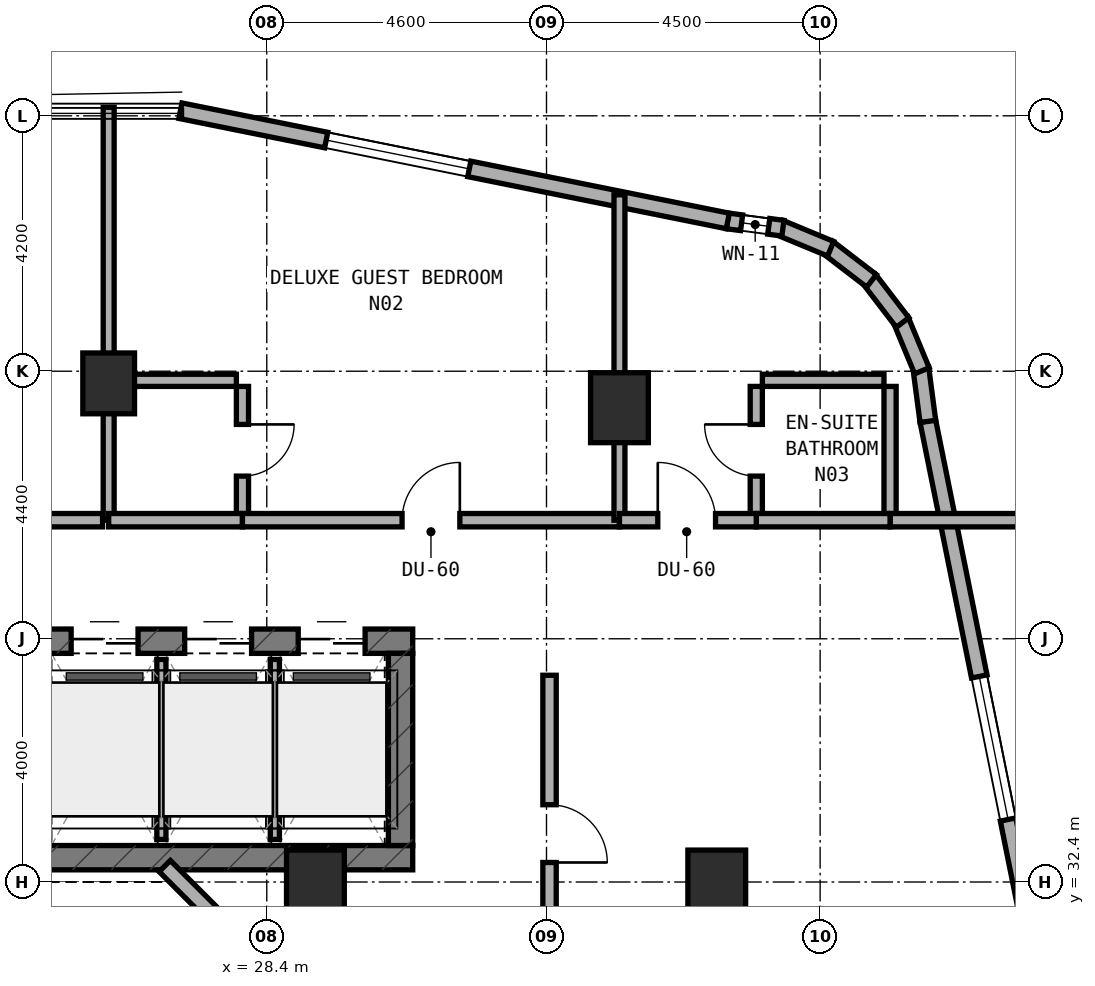
"""IFC4 building model, lengths in metres.
Left out: names, types, materials, properties, quantities, classifications, styles, units other than length and angle.
Written with IfcOpenShell. Run it as: python <this file> out.ifc"""

import sys

from ifc_helpers import new_model, si_unit, direction, frame, frame_2d, origin, origin_2d, place, context, subcontext, project, spatial, rectangle, extrude, element, fill, save


model = new_model("IFC4")
c1 = context("Model", 3, precision=1e-05, world=origin(), true_north=direction((0.0, 1.0)))
c2 = subcontext(c1, "Body", "Model", "MODEL_VIEW")
j1 = project(units=[si_unit("LENGTHUNIT", "METRE"), si_unit("PLANEANGLEUNIT", "RADIAN")], contexts=[c1])
p1 = place(None, origin())
s1 = spatial("IfcSite", under=j1, at=p1, CompositionType="ELEMENT")
p2 = place(p1, origin())
s2 = spatial("IfcBuilding", under=s1, at=p2, CompositionType="ELEMENT")
p3 = place(p2, frame((0.0, 0.0, 98.5)))
s3 = spatial("IfcBuildingStorey", under=s2, at=p3, CompositionType="ELEMENT", Elevation=98.5)
p4 = place(p3, frame((6.4, 32.8, 0.0), z_axis=(0.0, 0.0, 1.0), x_axis=(1.0, 0.0, 0.0)))
e1 = element("IfcWall", 1, at=p4, inside=s3, PredefinedType="SHEAR", context=c2, shape_type="SweptSolid", body=[
    extrude(rectangle(XDim=24.4, YDim=0.4, at=frame_2d((12.2, 0.0))), origin(), (0.0, 0.0, 1.0), 3.5),
])
p5 = place(p4, frame((6.05, 0.0, 0.0)))
e2 = element("IfcOpeningElement", 2, at=p5, cuts=e1, PredefinedType="OPENING", context=c2, shape_type="SweptSolid", body=[
    extrude(rectangle(XDim=1.1, YDim=2.15, at=frame_2d((0.55, 1.075))), frame((0.0, 0.21, 0.0), z_axis=(0.0, -1.0, 0.0), x_axis=(1.0, 0.0, 0.0)), (0.0, 0.0, 1.0), 0.42),
])
p6 = place(p3, frame((6.4, 36.36, 0.0), z_axis=(0.0, 0.0, 1.0), x_axis=(1.0, 0.0, 0.0)))
e3 = element("IfcWall", 3, at=p6, inside=s3, PredefinedType="SHEAR", context=c2, shape_type="SweptSolid", body=[
    extrude(rectangle(XDim=24.4, YDim=0.4, at=frame_2d((12.2, 0.0))), origin(), (0.0, 0.0, 1.0), 3.5),
])
p7 = place(p6, frame((9.15, 0.0, 0.0)))
e4 = element("IfcOpeningElement", 4, at=p7, cuts=e3, PredefinedType="OPENING", context=c2, shape_type="SweptSolid", body=[
    extrude(rectangle(XDim=1.2, YDim=2.15, at=frame_2d((0.6, 1.075))), frame((0.0, 0.21, 0.0), z_axis=(0.0, -1.0, 0.0), x_axis=(1.0, 0.0, 0.0)), (0.0, 0.0, 1.0), 0.42),
])
p8 = place(p6, frame((16.94, 0.0, 0.0)))
e5 = element("IfcOpeningElement", 5, at=p8, cuts=e3, PredefinedType="OPENING", context=c2, shape_type="SweptSolid", body=[
    extrude(rectangle(XDim=0.85, YDim=2.1, at=frame_2d((0.425, 1.05))), frame((0.0, 0.21, 0.0), z_axis=(0.0, -1.0, 0.0), x_axis=(1.0, 0.0, 0.0)), (0.0, 0.0, 1.0), 0.42),
])
p9 = place(p6, frame((18.783, 0.0, 0.0)))
e6 = element("IfcOpeningElement", 6, at=p9, cuts=e3, PredefinedType="OPENING", context=c2, shape_type="SweptSolid", body=[
    extrude(rectangle(XDim=1.1, YDim=2.15, at=frame_2d((0.55, 1.075))), frame((0.0, 0.21, 0.0), z_axis=(0.0, -1.0, 0.0), x_axis=(1.0, 0.0, 0.0)), (0.0, 0.0, 1.0), 0.42),
])
p10 = place(p6, frame((20.65, 0.0, 0.0)))
e7 = element("IfcOpeningElement", 7, at=p10, cuts=e3, PredefinedType="OPENING", context=c2, shape_type="SweptSolid", body=[
    extrude(rectangle(XDim=1.1, YDim=2.15, at=frame_2d((0.55, 1.075))), frame((0.0, 0.21, 0.0), z_axis=(0.0, -1.0, 0.0), x_axis=(1.0, 0.0, 0.0)), (0.0, 0.0, 1.0), 0.42),
])
p11 = place(p6, frame((22.517, 0.0, 0.0)))
e8 = element("IfcOpeningElement", 8, at=p11, cuts=e3, PredefinedType="OPENING", context=c2, shape_type="SweptSolid", body=[
    extrude(rectangle(XDim=1.1, YDim=2.15, at=frame_2d((0.55, 1.075))), frame((0.0, 0.21, 0.0), z_axis=(0.0, -1.0, 0.0), x_axis=(1.0, 0.0, 0.0)), (0.0, 0.0, 1.0), 0.42),
])
p12 = place(p3, frame((30.6, 33.0, 0.0), z_axis=(0.0, 0.0, 1.0), x_axis=(0.0, 1.0, 0.0)))
e9 = element("IfcWall", 9, at=p12, inside=s3, PredefinedType="SHEAR", context=c2, shape_type="SweptSolid", body=[
    extrude(rectangle(XDim=3.16, YDim=0.4, at=frame_2d((1.58, 0.0))), origin(), (0.0, 0.0, 1.0), 3.5),
])
p13 = place(p3, frame((25.8, 40.6, 0.0), z_axis=(0.0, 0.0, 1.0), x_axis=(1.0, 0.0, 0.0)))
e10 = element("IfcColumn", 10, at=p13, inside=s3, PredefinedType="COLUMN", context=c2, shape_type="SweptSolid", body=[
    extrude(rectangle(XDim=0.85, YDim=1.0, at=origin_2d()), origin(), (0.0, 0.0, 1.0), 3.5),
])
for number, where, z_axis, x_axis in (
    (11, (34.2, 40.2, 0.0), (0.0, 0.0, 1.0), (1.0, 0.0, 0.0)),
    (12, (35.8, 32.35, 0.0), (0.0, 0.0, 1.0), (1.0, 0.0, 0.0)),
    (13, (29.2, 32.35, 0.0), (0.0, 0.0, 1.0), (1.0, 0.0, 0.0)),
):
    element("IfcColumn", number, at=place(p3, frame(where, z_axis=z_axis, x_axis=x_axis)), inside=s3, PredefinedType="COLUMN", context=c2, shape_type="SweptSolid", body=[
        extrude(rectangle(XDim=0.95, YDim=1.15, at=origin_2d()), origin(), (0.0, 0.0, 1.0), 3.5),
    ])
p14 = place(p3, frame((41.084, 30.98, 0.0), z_axis=(0.0, 0.0, 1.0), x_axis=(-0.197435082048, 0.980315963543, 0.0)))
e14 = element("IfcWall", 14, at=p14, inside=s3, PredefinedType="STANDARD", context=c2, shape_type="SweptSolid", body=[
    extrude(rectangle(XDim=9.183, YDim=0.26, at=frame_2d((4.591, 0.0))), origin(), (0.0, 0.0, 1.0), 3.22),
])
p15 = place(p14, frame((2.497, 0.0, 0.8)))
e15 = element("IfcOpeningElement", 15, at=p15, cuts=e14, PredefinedType="OPENING", context=c2, shape_type="SweptSolid", body=[
    extrude(rectangle(XDim=2.4, YDim=1.6, at=frame_2d((1.2, 0.8))), frame((0.0, 0.14, 0.0), z_axis=(0.0, -1.0, 0.0), x_axis=(1.0, 0.0, 0.0)), (0.0, 0.0, 1.0), 0.28),
])
p16 = place(p3, frame((39.272, 39.975, 0.0), z_axis=(0.0, 0.0, 1.0), x_axis=(-0.130953706898, 0.991388484223, 0.0)))
e16 = element("IfcWall", 16, at=p16, inside=s3, PredefinedType="STANDARD", context=c2, shape_type="SweptSolid", body=[
    extrude(rectangle(XDim=0.885, YDim=0.26, at=frame_2d((0.443, 0.0))), origin(), (0.0, 0.0, 1.0), 3.22),
])
p17 = place(p3, frame((39.174, 40.807, 0.0), z_axis=(0.0, 0.0, 1.0), x_axis=(-0.383290660547, 0.923627776508, 0.0)))
e17 = element("IfcWall", 17, at=p17, inside=s3, PredefinedType="STANDARD", context=c2, shape_type="SweptSolid", body=[
    extrude(rectangle(XDim=0.903, YDim=0.26, at=frame_2d((0.452, 0.0))), origin(), (0.0, 0.0, 1.0), 3.22),
])
p18 = place(p3, frame((38.856, 41.601, 0.0), z_axis=(0.0, 0.0, 1.0), x_axis=(-0.608624690463, 0.793458244748, 0.0)))
e18 = element("IfcWall", 18, at=p18, inside=s3, PredefinedType="STANDARD", context=c2, shape_type="SweptSolid", body=[
    extrude(rectangle(XDim=0.902, YDim=0.26, at=frame_2d((0.451, 0.0))), origin(), (0.0, 0.0, 1.0), 3.22),
])
p19 = place(p3, frame((38.345, 42.286, 0.0), z_axis=(0.0, 0.0, 1.0), x_axis=(-0.793558456666, 0.608494022858, 0.0)))
e19 = element("IfcWall", 19, at=p19, inside=s3, PredefinedType="STANDARD", context=c2, shape_type="SweptSolid", body=[
    extrude(rectangle(XDim=0.902, YDim=0.26, at=frame_2d((0.451, 0.0))), origin(), (0.0, 0.0, 1.0), 3.22),
])
p20 = place(p3, frame((37.673, 42.814, 0.0), z_axis=(0.0, 0.0, 1.0), x_axis=(-0.923683767999, 0.383155708213, 0.0)))
e20 = element("IfcWall", 20, at=p20, inside=s3, PredefinedType="STANDARD", context=c2, shape_type="SweptSolid", body=[
    extrude(rectangle(XDim=0.903, YDim=0.26, at=frame_2d((0.451, 0.0))), origin(), (0.0, 0.0, 1.0), 3.22),
])
p21 = place(p3, frame((36.888, 43.152, 0.0), z_axis=(0.0, 0.0, 1.0), x_axis=(-0.991487658083, 0.130200706103, 0.0)))
e21 = element("IfcWall", 21, at=p21, inside=s3, PredefinedType="STANDARD", context=c2, shape_type="SweptSolid", body=[
    extrude(rectangle(XDim=0.921, YDim=0.26, at=frame_2d((0.46, 0.0))), origin(), (0.0, 0.0, 1.0), 3.22),
])
p22 = place(p21, frame((0.235, 0.0, 0.85)))
e22 = element("IfcOpeningElement", 22, at=p22, cuts=e21, PredefinedType="OPENING", context=c2, shape_type="SweptSolid", body=[
    extrude(rectangle(XDim=0.45, YDim=1.5, at=frame_2d((0.225, 0.75))), frame((0.0, 0.14, 0.0), z_axis=(0.0, -1.0, 0.0), x_axis=(1.0, 0.0, 0.0)), (0.0, 0.0, 1.0), 0.28),
])
p23 = place(p3, frame((35.982, 43.271, 0.0), z_axis=(0.0, 0.0, 1.0), x_axis=(-0.980315963543, 0.197435082048, 0.0)))
e23 = element("IfcWall", 23, at=p23, inside=s3, PredefinedType="STANDARD", context=c2, shape_type="SweptSolid", body=[
    extrude(rectangle(XDim=9.183, YDim=0.26, at=frame_2d((4.591, 0.0))), origin(), (0.0, 0.0, 1.0), 3.22),
])
p24 = place(p23, frame((4.337, 0.0, 0.8)))
e24 = element("IfcOpeningElement", 24, at=p24, cuts=e23, PredefinedType="OPENING", context=c2, shape_type="SweptSolid", body=[
    extrude(rectangle(XDim=2.4, YDim=1.6, at=frame_2d((1.2, 0.8))), frame((0.0, 0.14, 0.0), z_axis=(0.0, -1.0, 0.0), x_axis=(1.0, 0.0, 0.0)), (0.0, 0.0, 1.0), 0.28),
])
p25 = place(p3, frame((28.556, 30.828, 0.0), z_axis=(0.0, 0.0, 1.0), x_axis=(-0.707059717605, 0.707153841636, 0.0)))
e25 = element("IfcWall", 25, at=p25, inside=s3, PredefinedType="STANDARD", context=c2, shape_type="SweptSolid", body=[
    extrude(rectangle(XDim=2.594, YDim=0.26, at=frame_2d((1.297, 0.0))), origin(), (0.0, 0.0, 1.0), 3.22),
])
p26 = place(p3, frame((26.667, 33.1, 0.0), z_axis=(0.0, 0.0, 1.0), x_axis=(0.0, 1.0, 0.0)))
e26 = element("IfcWall", 26, at=p26, inside=s3, PredefinedType="PARTITIONING", context=c2, shape_type="SweptSolid", body=[
    extrude(rectangle(XDim=2.96, YDim=0.15, at=frame_2d((1.48, 0.0))), origin(), (0.0, 0.0, 1.0), 3.22),
])
p27 = place(p3, frame((28.533, 33.1, 0.0), z_axis=(0.0, 0.0, 1.0), x_axis=(0.0, 1.0, 0.0)))
e27 = element("IfcWall", 27, at=p27, inside=s3, PredefinedType="PARTITIONING", context=c2, shape_type="SweptSolid", body=[
    extrude(rectangle(XDim=2.96, YDim=0.15, at=frame_2d((1.48, 0.0))), origin(), (0.0, 0.0, 1.0), 2.595),
])
p28 = place(p3, frame((16.3, 38.35, 0.0), z_axis=(0.0, 0.0, 1.0), x_axis=(1.0, 0.0, 0.0)))
e28 = element("IfcWall", 28, at=p28, inside=s3, PredefinedType="SOLIDWALL", context=c2, shape_type="SweptSolid", body=[
    extrude(rectangle(XDim=9.4, YDim=0.22, at=frame_2d((4.7, 0.0))), origin(), (0.0, 0.0, 1.0), 3.22),
])
p29 = place(p28, frame((3.793, 0.0, 0.0)))
e29 = element("IfcOpeningElement", 29, at=p29, cuts=e28, PredefinedType="OPENING", context=c2, shape_type="SweptSolid", body=[
    extrude(rectangle(XDim=0.95, YDim=2.1, at=frame_2d((0.475, 1.05))), frame((0.0, 0.12, 0.0), z_axis=(0.0, -1.0, 0.0), x_axis=(1.0, 0.0, 0.0)), (0.0, 0.0, 1.0), 0.24),
])
p30 = place(p3, frame((25.8, 38.35, 0.0), z_axis=(0.0, 0.0, 1.0), x_axis=(0.0, 1.0, 0.0)))
e30 = element("IfcWall", 30, at=p30, inside=s3, PredefinedType="SOLIDWALL", context=c2, shape_type="SweptSolid", body=[
    extrude(rectangle(XDim=6.79, YDim=0.18, at=frame_2d((3.395, 0.0))), origin(), (0.0, 0.0, 1.0), 2.595),
])
p31 = place(p3, frame((28.0, 38.45, 0.0), z_axis=(0.0, 0.0, 1.0), x_axis=(0.0, 1.0, 0.0)))
e31 = element("IfcWall", 31, at=p31, inside=s3, PredefinedType="PLUMBINGWALL", context=c2, shape_type="SweptSolid", body=[
    extrude(rectangle(XDim=2.1, YDim=0.2, at=frame_2d((1.05, 0.0))), origin(), (0.0, 0.0, 1.0), 2.835),
])
p32 = place(p31, frame((0.625, 0.0, 0.0)))
e32 = element("IfcOpeningElement", 32, at=p32, cuts=e31, PredefinedType="OPENING", context=c2, shape_type="SweptSolid", body=[
    extrude(rectangle(XDim=0.85, YDim=2.1, at=frame_2d((0.425, 1.05))), frame((0.0, 0.11, 0.0), z_axis=(0.0, -1.0, 0.0), x_axis=(1.0, 0.0, 0.0)), (0.0, 0.0, 1.0), 0.22),
])
p33 = place(p3, frame((25.9, 40.65, 0.0), z_axis=(0.0, 0.0, 1.0), x_axis=(1.0, 0.0, 0.0)))
e33 = element("IfcWall", 33, at=p33, inside=s3, PredefinedType="PLUMBINGWALL", context=c2, shape_type="SweptSolid", body=[
    extrude(rectangle(XDim=2.0, YDim=0.2, at=frame_2d((1.0, 0.0))), origin(), (0.0, 0.0, 1.0), 2.835),
])
p34 = place(p3, frame((25.8, 38.35, 0.0), z_axis=(0.0, 0.0, 1.0), x_axis=(1.0, 0.0, 0.0)))
e34 = element("IfcWall", 34, at=p34, inside=s3, PredefinedType="SOLIDWALL", context=c2, shape_type="SweptSolid", body=[
    extrude(rectangle(XDim=2.2, YDim=0.22, at=frame_2d((1.1, 0.0))), origin(), (0.0, 0.0, 1.0), 2.595),
])
p35 = place(p3, frame((28.0, 38.35, 0.0), z_axis=(0.0, 0.0, 1.0), x_axis=(1.0, 0.0, 0.0)))
e35 = element("IfcWall", 35, at=p35, inside=s3, PredefinedType="SOLIDWALL", context=c2, shape_type="SweptSolid", body=[
    extrude(rectangle(XDim=6.2, YDim=0.22, at=frame_2d((3.1, 0.0))), origin(), (0.0, 0.0, 1.0), 2.595),
])
p36 = place(p35, frame((2.625, 0.0, 0.0)))
e36 = element("IfcOpeningElement", 36, at=p36, cuts=e35, PredefinedType="OPENING", context=c2, shape_type="SweptSolid", body=[
    extrude(rectangle(XDim=0.95, YDim=2.1, at=frame_2d((0.475, 1.05))), frame((0.0, 0.12, 0.0), z_axis=(0.0, -1.0, 0.0), x_axis=(1.0, 0.0, 0.0)), (0.0, 0.0, 1.0), 0.24),
])
p37 = place(p3, frame((34.2, 38.35, 0.0), z_axis=(0.0, 0.0, 1.0), x_axis=(0.0, 1.0, 0.0)))
e37 = element("IfcWall", 37, at=p37, inside=s3, PredefinedType="SOLIDWALL", context=c2, shape_type="SweptSolid", body=[
    extrude(rectangle(XDim=5.351, YDim=0.18, at=frame_2d((2.675, 0.0))), origin(), (0.0, 0.0, 1.0), 2.595),
])
p38 = place(p3, frame((36.45, 38.45, 0.0), z_axis=(0.0, 0.0, 1.0), x_axis=(0.0, 1.0, 0.0)))
e38 = element("IfcWall", 38, at=p38, inside=s3, PredefinedType="PLUMBINGWALL", context=c2, shape_type="SweptSolid", body=[
    extrude(rectangle(XDim=2.1, YDim=0.2, at=frame_2d((1.05, 0.0))), origin(), (0.0, 0.0, 1.0), 3.22),
])
p39 = place(p38, frame((0.625, 0.0, 0.0)))
e39 = element("IfcOpeningElement", 39, at=p39, cuts=e38, PredefinedType="OPENING", context=c2, shape_type="SweptSolid", body=[
    extrude(rectangle(XDim=0.85, YDim=2.1, at=frame_2d((0.425, 1.05))), frame((0.0, 0.11, 0.0), z_axis=(0.0, -1.0, 0.0), x_axis=(1.0, 0.0, 0.0)), (0.0, 0.0, 1.0), 0.22),
])
p40 = place(p3, frame((36.55, 40.65, 0.0), z_axis=(0.0, 0.0, 1.0), x_axis=(1.0, 0.0, 0.0)))
e40 = element("IfcWall", 40, at=p40, inside=s3, PredefinedType="PLUMBINGWALL", context=c2, shape_type="SweptSolid", body=[
    extrude(rectangle(XDim=2.0, YDim=0.2, at=frame_2d((1.0, 0.0))), origin(), (0.0, 0.0, 1.0), 3.22),
])
p41 = place(p3, frame((38.65, 38.45, 0.0), z_axis=(0.0, 0.0, 1.0), x_axis=(0.0, 1.0, 0.0)))
e41 = element("IfcWall", 41, at=p41, inside=s3, PredefinedType="PLUMBINGWALL", context=c2, shape_type="SweptSolid", body=[
    extrude(rectangle(XDim=2.1, YDim=0.2, at=frame_2d((1.05, 0.0))), origin(), (0.0, 0.0, 1.0), 3.22),
])
p42 = place(p3, frame((38.65, 38.35, 0.0), z_axis=(0.0, 0.0, 1.0), x_axis=(1.0, 0.0, 0.0)))
e42 = element("IfcWall", 42, at=p42, inside=s3, PredefinedType="SOLIDWALL", context=c2, shape_type="SweptSolid", body=[
    extrude(rectangle(XDim=2.39, YDim=0.22, at=frame_2d((1.195, 0.0))), origin(), (0.0, 0.0, 1.0), 3.22),
])
p43 = place(p3, frame((36.45, 38.35, 0.0), z_axis=(0.0, 0.0, 1.0), x_axis=(1.0, 0.0, 0.0)))
e43 = element("IfcWall", 43, at=p43, inside=s3, PredefinedType="SOLIDWALL", context=c2, shape_type="SweptSolid", body=[
    extrude(rectangle(XDim=2.2, YDim=0.22, at=frame_2d((1.1, 0.0))), origin(), (0.0, 0.0, 1.0), 3.22),
])
p44 = place(p3, frame((34.2, 38.35, 0.0), z_axis=(0.0, 0.0, 1.0), x_axis=(1.0, 0.0, 0.0)))
e44 = element("IfcWall", 44, at=p44, inside=s3, PredefinedType="SOLIDWALL", context=c2, shape_type="SweptSolid", body=[
    extrude(rectangle(XDim=2.25, YDim=0.22, at=frame_2d((1.125, 0.0))), origin(), (0.0, 0.0, 1.0), 2.595),
])
p45 = place(p44, frame((0.63, 0.0, 0.0)))
e45 = element("IfcOpeningElement", 45, at=p45, cuts=e44, PredefinedType="OPENING", context=c2, shape_type="SweptSolid", body=[
    extrude(rectangle(XDim=0.95, YDim=2.1, at=frame_2d((0.475, 1.05))), frame((0.0, 0.12, 0.0), z_axis=(0.0, -1.0, 0.0), x_axis=(1.0, 0.0, 0.0)), (0.0, 0.0, 1.0), 0.24),
])
p46 = place(p3, frame((33.05, 30.593, 0.0), z_axis=(0.0, 0.0, 1.0), x_axis=(0.0, 1.0, 0.0)))
e46 = element("IfcWall", 46, at=p46, inside=s3, PredefinedType="SOLIDWALL", context=c2, shape_type="SweptSolid", body=[
    extrude(rectangle(XDim=5.207, YDim=0.22, at=frame_2d((2.604, 0.0))), origin(), (0.0, 0.0, 1.0), 2.595),
])
p47 = place(p46, frame((2.128, 0.0, 0.0)))
e47 = element("IfcOpeningElement", 47, at=p47, cuts=e46, PredefinedType="OPENING", context=c2, shape_type="SweptSolid", body=[
    extrude(rectangle(XDim=0.95, YDim=2.1, at=frame_2d((0.475, 1.05))), frame((0.0, 0.12, 0.0), z_axis=(0.0, -1.0, 0.0), x_axis=(1.0, 0.0, 0.0)), (0.0, 0.0, 1.0), 0.24),
])
p48 = place(p15, origin())
e48 = element("IfcWindow", 48, at=p48, inside=s3, PartitioningType="SINGLE_PANEL", PredefinedType="WINDOW", context=c2, shape_type="SweptSolid", body=[
    extrude(rectangle(XDim=2.4, YDim=1.6, at=frame_2d((1.2, 0.8))), frame((0.0, 0.03, 0.0), z_axis=(0.0, -1.0, 0.0), x_axis=(1.0, 0.0, 0.0)), (0.0, 0.0, 1.0), 0.06),
])
fill(e15, e48)
p49 = place(p24, origin())
e49 = element("IfcWindow", 49, at=p49, inside=s3, PartitioningType="SINGLE_PANEL", PredefinedType="WINDOW", context=c2, shape_type="SweptSolid", body=[
    extrude(rectangle(XDim=2.4, YDim=1.6, at=frame_2d((1.2, 0.8))), frame((0.0, 0.03, 0.0), z_axis=(0.0, -1.0, 0.0), x_axis=(1.0, 0.0, 0.0)), (0.0, 0.0, 1.0), 0.06),
])
fill(e24, e49)
p50 = place(p22, origin())
e50 = element("IfcWindow", 50, at=p50, inside=s3, PartitioningType="SINGLE_PANEL", PredefinedType="WINDOW", context=c2, shape_type="SweptSolid", body=[
    extrude(rectangle(XDim=0.45, YDim=1.5, at=frame_2d((0.225, 0.75))), frame((0.0, 0.03, 0.0), z_axis=(0.0, -1.0, 0.0), x_axis=(1.0, 0.0, 0.0)), (0.0, 0.0, 1.0), 0.06),
])
fill(e22, e50)
p51 = place(p9, origin())
e51 = element("IfcDoor", 51, at=p51, inside=s3, OperationType="DOUBLE_DOOR_SLIDING", PredefinedType="DOOR", context=c2, shape_type="SweptSolid", body=[
    extrude(rectangle(XDim=1.1, YDim=2.15, at=frame_2d((0.55, 1.075))), frame((0.0, 0.025, 0.0), z_axis=(0.0, -1.0, 0.0), x_axis=(1.0, 0.0, 0.0)), (0.0, 0.0, 1.0), 0.05),
])
fill(e6, e51)
p52 = place(p10, origin())
e52 = element("IfcDoor", 52, at=p52, inside=s3, OperationType="DOUBLE_DOOR_SLIDING", PredefinedType="DOOR", context=c2, shape_type="SweptSolid", body=[
    extrude(rectangle(XDim=1.1, YDim=2.15, at=frame_2d((0.55, 1.075))), frame((0.0, 0.025, 0.0), z_axis=(0.0, -1.0, 0.0), x_axis=(1.0, 0.0, 0.0)), (0.0, 0.0, 1.0), 0.05),
])
fill(e7, e52)
p53 = place(p11, origin())
e53 = element("IfcDoor", 53, at=p53, inside=s3, OperationType="DOUBLE_DOOR_SLIDING", PredefinedType="DOOR", context=c2, shape_type="SweptSolid", body=[
    extrude(rectangle(XDim=1.1, YDim=2.15, at=frame_2d((0.55, 1.075))), frame((0.0, 0.025, 0.0), z_axis=(0.0, -1.0, 0.0), x_axis=(1.0, 0.0, 0.0)), (0.0, 0.0, 1.0), 0.05),
])
fill(e8, e53)
p54 = place(p32, frame((0.85, 0.0, 0.0), z_axis=(0.0, 0.0, 1.0), x_axis=(-1.0, 0.0, 0.0)))
e54 = element("IfcDoor", 54, at=p54, inside=s3, OperationType="SINGLE_SWING_LEFT", PredefinedType="DOOR", context=c2, shape_type="SweptSolid", body=[
    extrude(rectangle(XDim=0.85, YDim=2.1, at=frame_2d((0.425, 1.05))), frame((0.0, 0.025, 0.0), z_axis=(0.0, -1.0, 0.0), x_axis=(1.0, 0.0, 0.0)), (0.0, 0.0, 1.0), 0.05),
])
fill(e32, e54)
p55 = place(p36, origin())
e55 = element("IfcDoor", 55, at=p55, inside=s3, OperationType="SINGLE_SWING_RIGHT", PredefinedType="DOOR", context=c2, shape_type="SweptSolid", body=[
    extrude(rectangle(XDim=0.95, YDim=2.1, at=frame_2d((0.475, 1.05))), frame((0.0, 0.025, 0.0), z_axis=(0.0, -1.0, 0.0), x_axis=(1.0, 0.0, 0.0)), (0.0, 0.0, 1.0), 0.05),
])
fill(e36, e55)
p56 = place(p39, origin())
e56 = element("IfcDoor", 56, at=p56, inside=s3, OperationType="SINGLE_SWING_RIGHT", PredefinedType="DOOR", context=c2, shape_type="SweptSolid", body=[
    extrude(rectangle(XDim=0.85, YDim=2.1, at=frame_2d((0.425, 1.05))), frame((0.0, 0.025, 0.0), z_axis=(0.0, -1.0, 0.0), x_axis=(1.0, 0.0, 0.0)), (0.0, 0.0, 1.0), 0.05),
])
fill(e39, e56)
p57 = place(p45, origin())
e57 = element("IfcDoor", 57, at=p57, inside=s3, OperationType="SINGLE_SWING_LEFT", PredefinedType="DOOR", context=c2, shape_type="SweptSolid", body=[
    extrude(rectangle(XDim=0.95, YDim=2.1, at=frame_2d((0.475, 1.05))), frame((0.0, 0.025, 0.0), z_axis=(0.0, -1.0, 0.0), x_axis=(1.0, 0.0, 0.0)), (0.0, 0.0, 1.0), 0.05),
])
fill(e45, e57)
p58 = place(p47, frame((0.95, 0.0, 0.0), z_axis=(0.0, 0.0, 1.0), x_axis=(-1.0, 0.0, 0.0)))
e58 = element("IfcDoor", 58, at=p58, inside=s3, OperationType="SINGLE_SWING_RIGHT", PredefinedType="DOOR", context=c2, shape_type="SweptSolid", body=[
    extrude(rectangle(XDim=0.95, YDim=2.1, at=frame_2d((0.475, 1.05))), frame((0.0, 0.025, 0.0), z_axis=(0.0, -1.0, 0.0), x_axis=(1.0, 0.0, 0.0)), (0.0, 0.0, 1.0), 0.05),
])
fill(e47, e58)
save(model, sys.argv[1])
